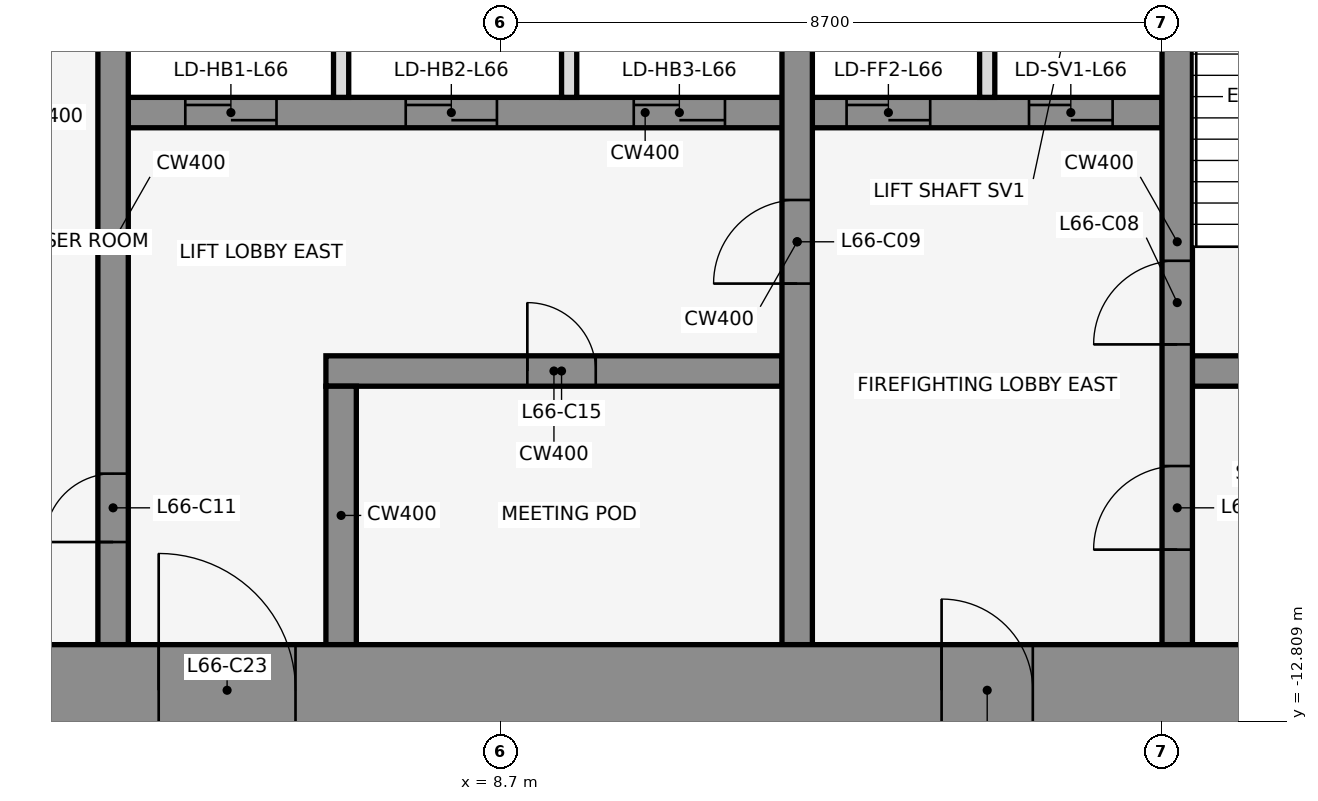
"""IFC4 building model, lengths in metres.
Left out: names, types, materials, properties, quantities, classifications, styles, units other than length and angle.
Written with IfcOpenShell. Run it as: python <this file> out.ifc"""

import sys

from ifc_helpers import new_model, si_unit, direction, frame, frame_2d, origin, place, context, subcontext, project, spatial, rectangle, extrude, element, fill, save


model = new_model("IFC4")
c1 = context("Model", 3, precision=1e-05, world=origin(), true_north=direction((0.0, 1.0)))
c2 = subcontext(c1, "Body", "Model", "MODEL_VIEW")
j1 = project(units=[si_unit("LENGTHUNIT", "METRE"), si_unit("PLANEANGLEUNIT", "RADIAN")], contexts=[c1])
p1 = place(None, origin())
s1 = spatial("IfcSite", under=j1, at=p1, CompositionType="ELEMENT")
p2 = place(p1, origin())
s2 = spatial("IfcBuilding", under=s1, at=p2, CompositionType="ELEMENT")
p3 = place(p2, frame((0.0, 0.0, 293.0)))
s3 = spatial("IfcBuildingStorey", under=s2, at=p3, CompositionType="ELEMENT", Elevation=293.0)
p4 = place(p3, frame((6.4, -8.2, 0.0), z_axis=(0.0, 0.0, 1.0), x_axis=(1.0, 0.0, 0.0)))
e1 = element("IfcWall", 1, at=p4, inside=s3, PredefinedType="SHEAR", context=c2, shape_type="SweptSolid", body=[
    extrude(rectangle(XDim=6.0, YDim=0.4, at=frame_2d((3.0, 0.0))), origin(), (0.0, 0.0, 1.0), 4.5),
])
p5 = place(p4, frame((2.65, 0.0, 0.0)))
e2 = element("IfcOpeningElement", 2, at=p5, cuts=e1, PredefinedType="OPENING", context=c2, shape_type="SweptSolid", body=[
    extrude(rectangle(XDim=0.9, YDim=2.1, at=frame_2d((0.45, 1.05))), frame((0.0, 0.212, 0.0), z_axis=(0.0, -1.0, 0.0), x_axis=(1.0, 0.0, 0.0)), (0.0, 0.0, 1.0), 0.424),
])
p6 = place(p3, frame((17.8, -8.2, 0.0), z_axis=(0.0, 0.0, 1.0), x_axis=(1.0, 0.0, 0.0)))
e3 = element("IfcWall", 3, at=p6, inside=s3, PredefinedType="SHEAR", context=c2, shape_type="SweptSolid", body=[
    extrude(rectangle(XDim=3.0, YDim=0.4, at=frame_2d((1.5, 0.0))), origin(), (0.0, 0.0, 1.0), 4.5),
])
p7 = place(p6, frame((0.85, 0.0, 0.0)))
e4 = element("IfcOpeningElement", 4, at=p7, cuts=e3, PredefinedType="OPENING", context=c2, shape_type="SweptSolid", body=[
    extrude(rectangle(XDim=1.2, YDim=2.1, at=frame_2d((0.6, 1.05))), frame((0.0, 0.212, 0.0), z_axis=(0.0, -1.0, 0.0), x_axis=(1.0, 0.0, 0.0)), (0.0, 0.0, 1.0), 0.424),
])
p8 = place(p3, frame((3.8, -4.8, 0.0), z_axis=(0.0, 0.0, 1.0), x_axis=(1.0, 0.0, 0.0)))
e5 = element("IfcWall", 5, at=p8, inside=s3, PredefinedType="SHEAR", context=c2, shape_type="SweptSolid", body=[
    extrude(rectangle(XDim=13.6, YDim=0.4, at=frame_2d((6.8, 0.0))), origin(), (0.0, 0.0, 1.0), 4.5),
])
p9 = place(p8, frame((0.75, 0.0, 0.0)))
e6 = element("IfcOpeningElement", 6, at=p9, cuts=e5, PredefinedType="OPENING", context=c2, shape_type="SweptSolid", body=[
    extrude(rectangle(XDim=1.2, YDim=2.1, at=frame_2d((0.6, 1.05))), frame((0.0, 0.212, 0.0), z_axis=(0.0, -1.0, 0.0), x_axis=(1.0, 0.0, 0.0)), (0.0, 0.0, 1.0), 0.424),
])
p10 = place(p8, frame((3.65, 0.0, 0.0)))
e7 = element("IfcOpeningElement", 7, at=p10, cuts=e5, PredefinedType="OPENING", context=c2, shape_type="SweptSolid", body=[
    extrude(rectangle(XDim=1.2, YDim=2.1, at=frame_2d((0.6, 1.05))), frame((0.0, 0.212, 0.0), z_axis=(0.0, -1.0, 0.0), x_axis=(1.0, 0.0, 0.0)), (0.0, 0.0, 1.0), 0.424),
])
p11 = place(p8, frame((6.65, 0.0, 0.0)))
e8 = element("IfcOpeningElement", 8, at=p11, cuts=e5, PredefinedType="OPENING", context=c2, shape_type="SweptSolid", body=[
    extrude(rectangle(XDim=1.2, YDim=2.1, at=frame_2d((0.6, 1.05))), frame((0.0, 0.212, 0.0), z_axis=(0.0, -1.0, 0.0), x_axis=(1.0, 0.0, 0.0)), (0.0, 0.0, 1.0), 0.424),
])
p12 = place(p8, frame((9.45, 0.0, 0.0)))
e9 = element("IfcOpeningElement", 9, at=p12, cuts=e5, PredefinedType="OPENING", context=c2, shape_type="SweptSolid", body=[
    extrude(rectangle(XDim=1.1, YDim=2.1, at=frame_2d((0.55, 1.05))), frame((0.0, 0.212, 0.0), z_axis=(0.0, -1.0, 0.0), x_axis=(1.0, 0.0, 0.0)), (0.0, 0.0, 1.0), 0.424),
])
p13 = place(p8, frame((11.85, 0.0, 0.0)))
e10 = element("IfcOpeningElement", 10, at=p13, cuts=e5, PredefinedType="OPENING", context=c2, shape_type="SweptSolid", body=[
    extrude(rectangle(XDim=1.1, YDim=2.1, at=frame_2d((0.55, 1.05))), frame((0.0, 0.212, 0.0), z_axis=(0.0, -1.0, 0.0), x_axis=(1.0, 0.0, 0.0)), (0.0, 0.0, 1.0), 0.424),
])
p14 = place(p3, frame((3.6, -11.8, 0.0), z_axis=(0.0, 0.0, 1.0), x_axis=(0.0, 1.0, 0.0)))
e11 = element("IfcWall", 11, at=p14, inside=s3, PredefinedType="SHEAR", context=c2, shape_type="SweptSolid", body=[
    extrude(rectangle(XDim=10.6, YDim=0.4, at=frame_2d((5.3, 0.0))), origin(), (0.0, 0.0, 1.0), 4.5),
])
p15 = place(p14, frame((1.35, 0.0, 0.0)))
e12 = element("IfcOpeningElement", 12, at=p15, cuts=e11, PredefinedType="OPENING", context=c2, shape_type="SweptSolid", body=[
    extrude(rectangle(XDim=0.9, YDim=2.1, at=frame_2d((0.45, 1.05))), frame((0.0, 0.212, 0.0), z_axis=(0.0, -1.0, 0.0), x_axis=(1.0, 0.0, 0.0)), (0.0, 0.0, 1.0), 0.424),
])
p16 = place(p3, frame((6.6, -11.8, 0.0), z_axis=(0.0, 0.0, 1.0), x_axis=(0.0, 1.0, 0.0)))
e13 = element("IfcWall", 13, at=p16, inside=s3, PredefinedType="SHEAR", context=c2, shape_type="SweptSolid", body=[
    extrude(rectangle(XDim=3.4, YDim=0.4, at=frame_2d((1.7, 0.0))), origin(), (0.0, 0.0, 1.0), 4.5),
])
for number, where, z_axis, x_axis in (
    (14, (6.6, -4.6, 0.0), (0.0, 0.0, 1.0), (0.0, 1.0, 0.0)),
    (15, (9.6, -4.6, 0.0), (0.0, 0.0, 1.0), (0.0, 1.0, 0.0)),
):
    element("IfcWall", number, at=place(p3, frame(where, z_axis=z_axis, x_axis=x_axis)), inside=s3, PredefinedType="PARTITIONING", context=c2, shape_type="SweptSolid", body=[
        extrude(rectangle(XDim=3.4, YDim=0.2, at=frame_2d((1.7, 0.0))), origin(), (0.0, 0.0, 1.0), 3.418),
    ])
p17 = place(p3, frame((12.6, -11.8, 0.0), z_axis=(0.0, 0.0, 1.0), x_axis=(0.0, 1.0, 0.0)))
e16 = element("IfcWall", 16, at=p17, inside=s3, PredefinedType="SHEAR", context=c2, shape_type="SweptSolid", body=[
    extrude(rectangle(XDim=10.6, YDim=0.4, at=frame_2d((5.3, 0.0))), origin(), (0.0, 0.0, 1.0), 4.5),
])
p18 = place(p17, frame((4.75, 0.0, 0.0)))
e17 = element("IfcOpeningElement", 17, at=p18, cuts=e16, PredefinedType="OPENING", context=c2, shape_type="SweptSolid", body=[
    extrude(rectangle(XDim=1.1, YDim=2.1, at=frame_2d((0.55, 1.05))), frame((0.0, 0.212, 0.0), z_axis=(0.0, -1.0, 0.0), x_axis=(1.0, 0.0, 0.0)), (0.0, 0.0, 1.0), 0.424),
])
p19 = place(p3, frame((15.1, -4.6, 0.0), z_axis=(0.0, 0.0, 1.0), x_axis=(0.0, 1.0, 0.0)))
e18 = element("IfcWall", 18, at=p19, inside=s3, PredefinedType="PARTITIONING", context=c2, shape_type="SweptSolid", body=[
    extrude(rectangle(XDim=3.4, YDim=0.2, at=frame_2d((1.7, 0.0))), origin(), (0.0, 0.0, 1.0), 3.418),
])
p20 = place(p3, frame((17.6, -11.8, 0.0), z_axis=(0.0, 0.0, 1.0), x_axis=(0.0, 1.0, 0.0)))
e19 = element("IfcWall", 19, at=p20, inside=s3, PredefinedType="SHEAR", context=c2, shape_type="SweptSolid", body=[
    extrude(rectangle(XDim=10.6, YDim=0.4, at=frame_2d((5.3, 0.0))), origin(), (0.0, 0.0, 1.0), 4.5),
])
p21 = place(p20, frame((1.25, 0.0, 0.0)))
e20 = element("IfcOpeningElement", 20, at=p21, cuts=e19, PredefinedType="OPENING", context=c2, shape_type="SweptSolid", body=[
    extrude(rectangle(XDim=1.1, YDim=2.1, at=frame_2d((0.55, 1.05))), frame((0.0, 0.212, 0.0), z_axis=(0.0, -1.0, 0.0), x_axis=(1.0, 0.0, 0.0)), (0.0, 0.0, 1.0), 0.424),
])
p22 = place(p20, frame((3.95, 0.0, 0.0)))
e21 = element("IfcOpeningElement", 21, at=p22, cuts=e19, PredefinedType="OPENING", context=c2, shape_type="SweptSolid", body=[
    extrude(rectangle(XDim=1.1, YDim=2.1, at=frame_2d((0.55, 1.05))), frame((0.0, 0.212, 0.0), z_axis=(0.0, -1.0, 0.0), x_axis=(1.0, 0.0, 0.0)), (0.0, 0.0, 1.0), 0.424),
])
p23 = place(p3, frame((-22.0, -12.4, 0.0), z_axis=(0.0, 0.0, 1.0), x_axis=(1.0, 0.0, 0.0)))
e22 = element("IfcWall", 22, at=p23, inside=s3, PredefinedType="SHEAR", context=c2, shape_type="SweptSolid", body=[
    extrude(rectangle(XDim=44.0, YDim=1.2, at=frame_2d((22.0, 0.0))), origin(), (0.0, 0.0, 1.0), 4.5),
])
p24 = place(p23, frame((2.2, 0.0, 0.0)))
e23 = element("IfcOpeningElement", 23, at=p24, cuts=e22, PredefinedType="OPENING", context=c2, shape_type="SweptSolid", body=[
    extrude(rectangle(XDim=1.2, YDim=2.1, at=frame_2d((0.6, 1.05))), frame((0.0, 0.612, 0.0), z_axis=(0.0, -1.0, 0.0), x_axis=(1.0, 0.0, 0.0)), (0.0, 0.0, 1.0), 1.224),
])
p25 = place(p23, frame((21.4, 0.0, 0.0)))
e24 = element("IfcOpeningElement", 24, at=p25, cuts=e22, PredefinedType="OPENING", context=c2, shape_type="SweptSolid", body=[
    extrude(rectangle(XDim=1.2, YDim=2.1, at=frame_2d((0.6, 1.05))), frame((0.0, 0.612, 0.0), z_axis=(0.0, -1.0, 0.0), x_axis=(1.0, 0.0, 0.0)), (0.0, 0.0, 1.0), 1.224),
])
p26 = place(p23, frame((40.6, 0.0, 0.0)))
e25 = element("IfcOpeningElement", 25, at=p26, cuts=e22, PredefinedType="OPENING", context=c2, shape_type="SweptSolid", body=[
    extrude(rectangle(XDim=1.2, YDim=2.1, at=frame_2d((0.6, 1.05))), frame((0.0, 0.612, 0.0), z_axis=(0.0, -1.0, 0.0), x_axis=(1.0, 0.0, 0.0)), (0.0, 0.0, 1.0), 1.224),
])
p27 = place(p23, frame((16.0, 0.0, 0.0)))
e26 = element("IfcOpeningElement", 26, at=p27, cuts=e22, PredefinedType="OPENING", context=c2, shape_type="SweptSolid", body=[
    extrude(rectangle(XDim=1.8, YDim=2.1, at=frame_2d((0.9, 1.05))), frame((0.0, 0.612, 0.0), z_axis=(0.0, -1.0, 0.0), x_axis=(1.0, 0.0, 0.0)), (0.0, 0.0, 1.0), 1.224),
])
p28 = place(p23, frame((6.3, 0.0, 0.0)))
e27 = element("IfcOpeningElement", 27, at=p28, cuts=e22, PredefinedType="OPENING", context=c2, shape_type="SweptSolid", body=[
    extrude(rectangle(XDim=1.2, YDim=2.1, at=frame_2d((0.6, 1.05))), frame((0.0, 0.612, 0.0), z_axis=(0.0, -1.0, 0.0), x_axis=(1.0, 0.0, 0.0)), (0.0, 0.0, 1.0), 1.224),
])
p29 = place(p23, frame((26.2, 0.0, 0.0)))
e28 = element("IfcOpeningElement", 28, at=p29, cuts=e22, PredefinedType="OPENING", context=c2, shape_type="SweptSolid", body=[
    extrude(rectangle(XDim=1.8, YDim=2.1, at=frame_2d((0.9, 1.05))), frame((0.0, 0.612, 0.0), z_axis=(0.0, -1.0, 0.0), x_axis=(1.0, 0.0, 0.0)), (0.0, 0.0, 1.0), 1.224),
])
p30 = place(p23, frame((36.5, 0.0, 0.0)))
e29 = element("IfcOpeningElement", 29, at=p30, cuts=e22, PredefinedType="OPENING", context=c2, shape_type="SweptSolid", body=[
    extrude(rectangle(XDim=1.2, YDim=2.1, at=frame_2d((0.6, 1.05))), frame((0.0, 0.612, 0.0), z_axis=(0.0, -1.0, 0.0), x_axis=(1.0, 0.0, 0.0)), (0.0, 0.0, 1.0), 1.224),
])
p31 = place(p21, origin())
e30 = element("IfcDoor", 30, at=p31, inside=s3, OperationType="SINGLE_SWING_LEFT", PredefinedType="DOOR", context=c2, shape_type="SweptSolid", body=[
    extrude(rectangle(XDim=1.1, YDim=2.1, at=frame_2d((0.55, 1.05))), frame((0.0, 0.025, 0.0), z_axis=(0.0, -1.0, 0.0), x_axis=(1.0, 0.0, 0.0)), (0.0, 0.0, 1.0), 0.05),
])
fill(e20, e30)
p32 = place(p9, origin())
e31 = element("IfcDoor", 31, at=p32, inside=s3, OperationType="DOUBLE_DOOR_SLIDING", PredefinedType="DOOR", context=c2, shape_type="SweptSolid", body=[
    extrude(rectangle(XDim=1.2, YDim=2.1, at=frame_2d((0.6, 1.05))), frame((0.0, 0.025, 0.0), z_axis=(0.0, -1.0, 0.0), x_axis=(1.0, 0.0, 0.0)), (0.0, 0.0, 1.0), 0.05),
])
fill(e6, e31)
p33 = place(p10, origin())
e32 = element("IfcDoor", 32, at=p33, inside=s3, OperationType="DOUBLE_DOOR_SLIDING", PredefinedType="DOOR", context=c2, shape_type="SweptSolid", body=[
    extrude(rectangle(XDim=1.2, YDim=2.1, at=frame_2d((0.6, 1.05))), frame((0.0, 0.025, 0.0), z_axis=(0.0, -1.0, 0.0), x_axis=(1.0, 0.0, 0.0)), (0.0, 0.0, 1.0), 0.05),
])
fill(e7, e32)
p34 = place(p11, origin())
e33 = element("IfcDoor", 33, at=p34, inside=s3, OperationType="DOUBLE_DOOR_SLIDING", PredefinedType="DOOR", context=c2, shape_type="SweptSolid", body=[
    extrude(rectangle(XDim=1.2, YDim=2.1, at=frame_2d((0.6, 1.05))), frame((0.0, 0.025, 0.0), z_axis=(0.0, -1.0, 0.0), x_axis=(1.0, 0.0, 0.0)), (0.0, 0.0, 1.0), 0.05),
])
fill(e8, e33)
p35 = place(p12, origin())
e34 = element("IfcDoor", 34, at=p35, inside=s3, OperationType="DOUBLE_DOOR_SLIDING", PredefinedType="DOOR", context=c2, shape_type="SweptSolid", body=[
    extrude(rectangle(XDim=1.1, YDim=2.1, at=frame_2d((0.55, 1.05))), frame((0.0, 0.025, 0.0), z_axis=(0.0, -1.0, 0.0), x_axis=(1.0, 0.0, 0.0)), (0.0, 0.0, 1.0), 0.05),
])
fill(e9, e34)
p36 = place(p13, origin())
e35 = element("IfcDoor", 35, at=p36, inside=s3, OperationType="DOUBLE_DOOR_SLIDING", PredefinedType="DOOR", context=c2, shape_type="SweptSolid", body=[
    extrude(rectangle(XDim=1.1, YDim=2.1, at=frame_2d((0.55, 1.05))), frame((0.0, 0.025, 0.0), z_axis=(0.0, -1.0, 0.0), x_axis=(1.0, 0.0, 0.0)), (0.0, 0.0, 1.0), 0.05),
])
fill(e10, e35)
p37 = place(p22, origin())
e36 = element("IfcDoor", 36, at=p37, inside=s3, OperationType="SINGLE_SWING_RIGHT", PredefinedType="DOOR", context=c2, shape_type="SweptSolid", body=[
    extrude(rectangle(XDim=1.1, YDim=2.1, at=frame_2d((0.55, 1.05))), frame((0.0, 0.025, 0.0), z_axis=(0.0, -1.0, 0.0), x_axis=(1.0, 0.0, 0.0)), (0.0, 0.0, 1.0), 0.05),
])
fill(e21, e36)
p38 = place(p18, frame((1.1, 0.0, 0.0), z_axis=(0.0, 0.0, 1.0), x_axis=(-1.0, 0.0, 0.0)))
e37 = element("IfcDoor", 37, at=p38, inside=s3, OperationType="SINGLE_SWING_RIGHT", PredefinedType="DOOR", context=c2, shape_type="SweptSolid", body=[
    extrude(rectangle(XDim=1.1, YDim=2.1, at=frame_2d((0.55, 1.05))), frame((0.0, 0.025, 0.0), z_axis=(0.0, -1.0, 0.0), x_axis=(1.0, 0.0, 0.0)), (0.0, 0.0, 1.0), 0.05),
])
fill(e17, e37)
p39 = place(p15, origin())
e38 = element("IfcDoor", 38, at=p39, inside=s3, OperationType="SINGLE_SWING_LEFT", PredefinedType="DOOR", context=c2, shape_type="SweptSolid", body=[
    extrude(rectangle(XDim=0.9, YDim=2.1, at=frame_2d((0.45, 1.05))), frame((0.0, 0.025, 0.0), z_axis=(0.0, -1.0, 0.0), x_axis=(1.0, 0.0, 0.0)), (0.0, 0.0, 1.0), 0.05),
])
fill(e12, e38)
p40 = place(p5, frame((0.9, 0.0, 0.0), z_axis=(0.0, 0.0, 1.0), x_axis=(-1.0, 0.0, 0.0)))
e39 = element("IfcDoor", 39, at=p40, inside=s3, OperationType="SINGLE_SWING_RIGHT", PredefinedType="DOOR", context=c2, shape_type="SweptSolid", body=[
    extrude(rectangle(XDim=0.9, YDim=2.1, at=frame_2d((0.45, 1.05))), frame((0.0, 0.025, 0.0), z_axis=(0.0, -1.0, 0.0), x_axis=(1.0, 0.0, 0.0)), (0.0, 0.0, 1.0), 0.05),
])
fill(e2, e39)
p41 = place(p29, origin())
e40 = element("IfcDoor", 40, at=p41, inside=s3, OperationType="SINGLE_SWING_LEFT", PredefinedType="DOOR", context=c2, shape_type="SweptSolid", body=[
    extrude(rectangle(XDim=1.8, YDim=2.1, at=frame_2d((0.9, 1.05))), frame((0.0, 0.025, 0.0), z_axis=(0.0, -1.0, 0.0), x_axis=(1.0, 0.0, 0.0)), (0.0, 0.0, 1.0), 0.05),
])
fill(e28, e40)
p42 = place(p30, frame((1.2, 0.0, 0.0), z_axis=(0.0, 0.0, 1.0), x_axis=(-1.0, 0.0, 0.0)))
e41 = element("IfcDoor", 41, at=p42, inside=s3, OperationType="SINGLE_SWING_RIGHT", PredefinedType="DOOR", context=c2, shape_type="SweptSolid", body=[
    extrude(rectangle(XDim=1.2, YDim=2.1, at=frame_2d((0.6, 1.05))), frame((0.0, 0.025, 0.0), z_axis=(0.0, -1.0, 0.0), x_axis=(1.0, 0.0, 0.0)), (0.0, 0.0, 1.0), 0.05),
])
fill(e29, e41)
save(model, sys.argv[1])
